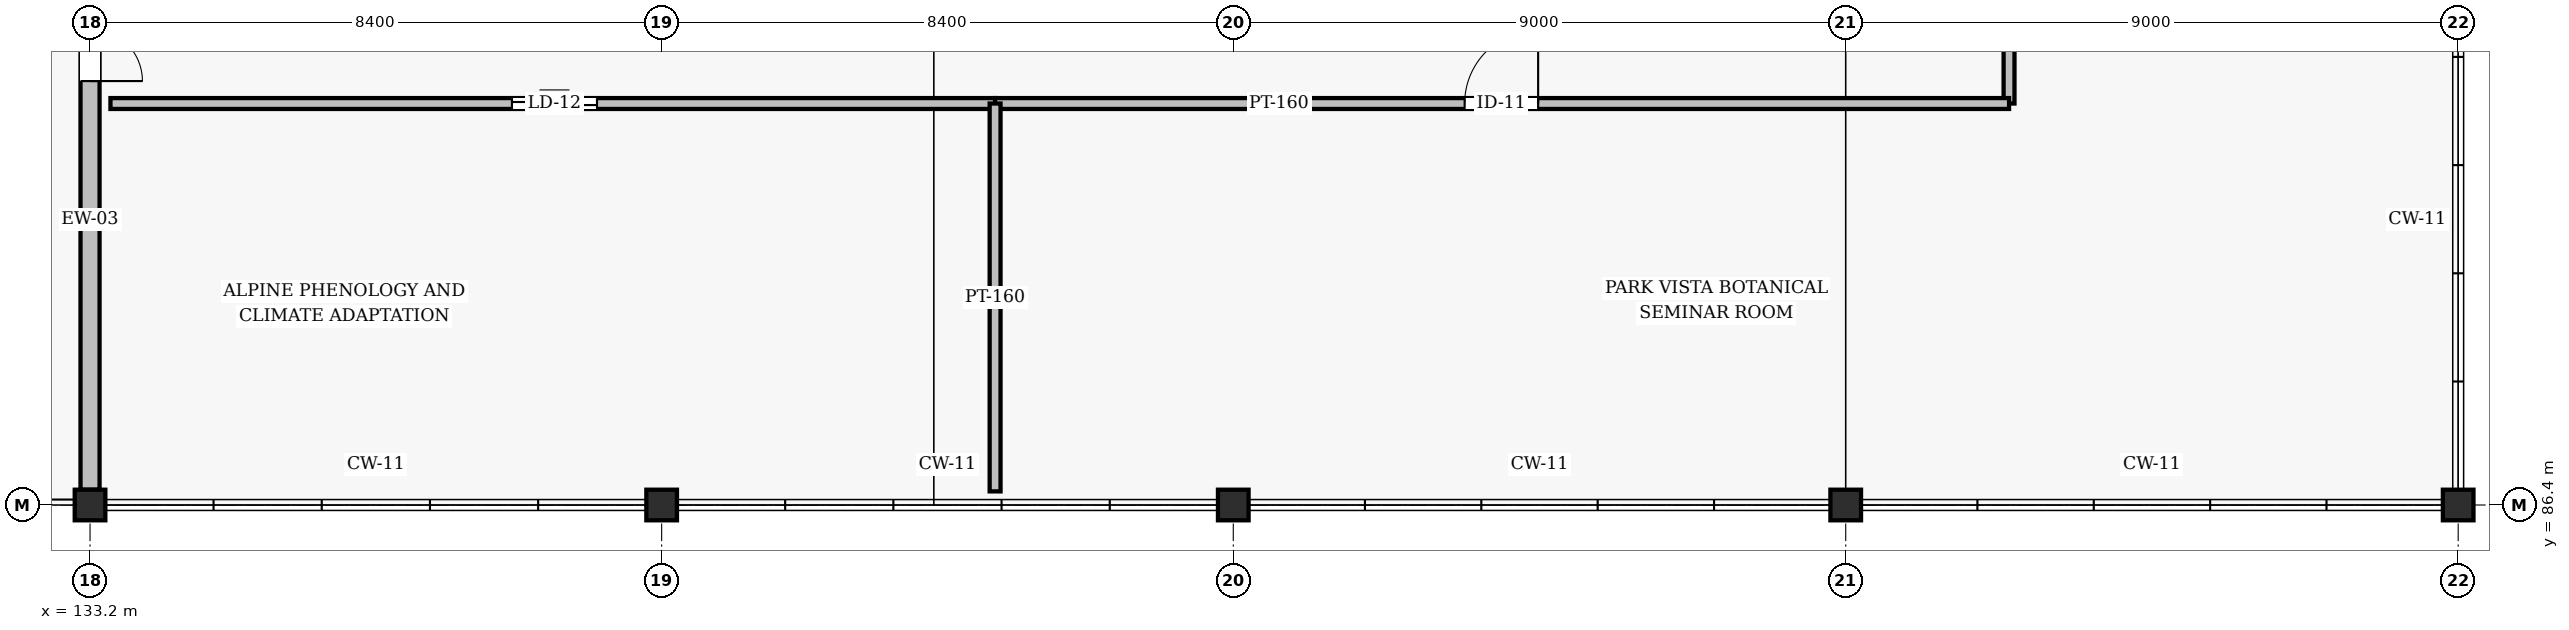
"""IFC4 building model, lengths in metres.
Left out: names, types, materials, properties, quantities, classifications, styles, units other than length and angle.
Written with IfcOpenShell. Run it as: python <this file> out.ifc"""

import sys

from ifc_helpers import new_model, si_unit, direction, frame, frame_2d, origin, origin_2d, place, context, subcontext, project, spatial, rectangle, hollow_rectangle, extrude, element, fill, save


model = new_model("IFC4")
c1 = context("Model", 3, precision=1e-05, world=origin(), true_north=direction((0.0, 1.0)))
c2 = subcontext(c1, "Body", "Model", "MODEL_VIEW")
j1 = project(units=[si_unit("LENGTHUNIT", "METRE"), si_unit("PLANEANGLEUNIT", "RADIAN")], contexts=[c1])
p1 = place(None, origin())
s1 = spatial("IfcSite", under=j1, at=p1, CompositionType="ELEMENT")
p2 = place(p1, origin())
s2 = spatial("IfcBuilding", under=s1, at=p2, CompositionType="ELEMENT")
p3 = place(p2, frame((0.0, 0.0, 50.4)))
s3 = spatial("IfcBuildingStorey", under=s2, at=p3, CompositionType="ELEMENT", Elevation=50.4)
for number, where, z_axis, x_axis in (
    (1, (133.2, 86.4, 0.0), (0.0, 0.0, 1.0), (1.0, 0.0, 0.0)),
    (2, (141.6, 86.4, 0.0), (0.0, 0.0, 1.0), (1.0, 0.0, 0.0)),
    (3, (150.0, 86.4, 0.0), (0.0, 0.0, 1.0), (1.0, 0.0, 0.0)),
    (4, (159.0, 86.4, 0.0), (0.0, 0.0, 1.0), (1.0, 0.0, 0.0)),
    (5, (168.0, 86.4, 0.0), (0.0, 0.0, 1.0), (1.0, 0.0, 0.0)),
):
    element("IfcColumn", number, at=place(p3, frame(where, z_axis=z_axis, x_axis=x_axis)), inside=s3, PredefinedType="COLUMN", context=c2, shape_type="SweptSolid", body=[
        extrude(hollow_rectangle(XDim=0.45, YDim=0.45, WallThickness=0.018, InnerFilletRadius=0.018, OuterFilletRadius=0.036, at=origin_2d()), origin(), (0.0, 0.0, 1.0), 3.6),
    ])
p4 = place(p3, frame((133.2, 94.575, 0.0), z_axis=(0.0, 0.0, 1.0), x_axis=(0.0, -1.0, 0.0)))
e6 = element("IfcWall", 6, at=p4, inside=s3, PredefinedType="SOLIDWALL", context=c2, shape_type="SweptSolid", body=[
    extrude(rectangle(XDim=7.95, YDim=0.28, at=frame_2d((3.975, 0.0))), origin(), (0.0, 0.0, 1.0), 2.846),
])
p5 = place(p4, frame((0.405, 0.0, 0.0)))
e7 = element("IfcOpeningElement", 7, at=p5, cuts=e6, PredefinedType="OPENING", context=c2, shape_type="SweptSolid", body=[
    extrude(rectangle(XDim=1.54, YDim=2.24, at=frame_2d((0.77, 1.12))), frame((0.0, 0.15, 0.0), z_axis=(0.0, -1.0, 0.0), x_axis=(1.0, 0.0, 0.0)), (0.0, 0.0, 1.0), 0.3),
])
p6 = place(p3, frame((161.4, 92.3, 0.0), z_axis=(0.0, 0.0, 1.0), x_axis=(0.0, 1.0, 0.0)))
e8 = element("IfcWall", 8, at=p6, inside=s3, PredefinedType="PARTITIONING", context=c2, shape_type="SweptSolid", body=[
    extrude(rectangle(XDim=14.1, YDim=0.16, at=frame_2d((7.05, 0.0))), origin(), (0.0, 0.0, 1.0), 2.75),
])
p7 = place(p6, frame((6.5, 0.0, 0.0)))
e9 = element("IfcOpeningElement", 9, at=p7, cuts=e8, PredefinedType="OPENING", context=c2, shape_type="SweptSolid", body=[
    extrude(rectangle(XDim=1.08, YDim=2.08, at=frame_2d((0.54, 1.04))), frame((0.0, 0.09, 0.0), z_axis=(0.0, -1.0, 0.0), x_axis=(1.0, 0.0, 0.0)), (0.0, 0.0, 1.0), 0.18),
])
p8 = place(p3, frame((133.5, 92.3, 0.0), z_axis=(0.0, 0.0, 1.0), x_axis=(1.0, 0.0, 0.0)))
e10 = element("IfcWall", 10, at=p8, inside=s3, PredefinedType="PARTITIONING", context=c2, shape_type="SweptSolid", body=[
    extrude(rectangle(XDim=13.0, YDim=0.16, at=frame_2d((6.5, 0.0))), origin(), (0.0, 0.0, 1.0), 2.846),
])
p9 = place(p8, frame((5.9, 0.0, 0.0)))
e11 = element("IfcOpeningElement", 11, at=p9, cuts=e10, PredefinedType="OPENING", context=c2, shape_type="SweptSolid", body=[
    extrude(rectangle(XDim=1.25, YDim=2.12, at=frame_2d((0.625, 1.06))), frame((0.0, 0.09, 0.0), z_axis=(0.0, -1.0, 0.0), x_axis=(1.0, 0.0, 0.0)), (0.0, 0.0, 1.0), 0.18),
])
p10 = place(p3, frame((146.5, 92.3, 0.0), z_axis=(0.0, 0.0, 1.0), x_axis=(1.0, 0.0, 0.0)))
e12 = element("IfcWall", 12, at=p10, inside=s3, PredefinedType="PARTITIONING", context=c2, shape_type="SweptSolid", body=[
    extrude(rectangle(XDim=14.9, YDim=0.16, at=frame_2d((7.45, 0.0))), origin(), (0.0, 0.0, 1.0), 2.846),
])
p11 = place(p10, frame((6.9, 0.0, 0.0)))
e13 = element("IfcOpeningElement", 13, at=p11, cuts=e12, PredefinedType="OPENING", context=c2, shape_type="SweptSolid", body=[
    extrude(rectangle(XDim=1.08, YDim=2.08, at=frame_2d((0.54, 1.04))), frame((0.0, 0.09, 0.0), z_axis=(0.0, -1.0, 0.0), x_axis=(1.0, 0.0, 0.0)), (0.0, 0.0, 1.0), 0.18),
])
p12 = place(p3, frame((146.5, 86.6, 0.0), z_axis=(0.0, 0.0, 1.0), x_axis=(0.0, 1.0, 0.0)))
e14 = element("IfcWall", 14, at=p12, inside=s3, PredefinedType="PARTITIONING", context=c2, shape_type="SweptSolid", body=[
    extrude(rectangle(XDim=5.7, YDim=0.16, at=frame_2d((2.85, 0.0))), origin(), (0.0, 0.0, 1.0), 3.0),
])
p13 = place(p5, frame((1.54, 0.0, 0.0), z_axis=(0.0, 0.0, 1.0), x_axis=(-1.0, 0.0, 0.0)))
e15 = element("IfcDoor", 15, at=p13, inside=s3, OperationType="DOUBLE_DOOR_SINGLE_SWING", PredefinedType="DOOR", context=c2, shape_type="SweptSolid", body=[
    extrude(rectangle(XDim=1.54, YDim=2.24, at=frame_2d((0.77, 1.12))), frame((0.0, 0.025, 0.0), z_axis=(0.0, -1.0, 0.0), x_axis=(1.0, 0.0, 0.0)), (0.0, 0.0, 1.0), 0.05),
])
fill(e7, e15)
p14 = place(p9, origin())
e16 = element("IfcDoor", 16, at=p14, inside=s3, OperationType="SINGLE_SWING_LEFT", PredefinedType="DOOR", context=c2, shape_type="SweptSolid", body=[
    extrude(rectangle(XDim=1.25, YDim=2.12, at=frame_2d((0.625, 1.06))), frame((0.0, 0.025, 0.0), z_axis=(0.0, -1.0, 0.0), x_axis=(1.0, 0.0, 0.0)), (0.0, 0.0, 1.0), 0.05),
])
fill(e11, e16)
p15 = place(p11, origin())
e17 = element("IfcDoor", 17, at=p15, inside=s3, OperationType="SINGLE_SWING_RIGHT", PredefinedType="DOOR", context=c2, shape_type="SweptSolid", body=[
    extrude(rectangle(XDim=1.08, YDim=2.08, at=frame_2d((0.54, 1.04))), frame((0.0, 0.025, 0.0), z_axis=(0.0, -1.0, 0.0), x_axis=(1.0, 0.0, 0.0)), (0.0, 0.0, 1.0), 0.05),
])
fill(e13, e17)
save(model, sys.argv[1])
